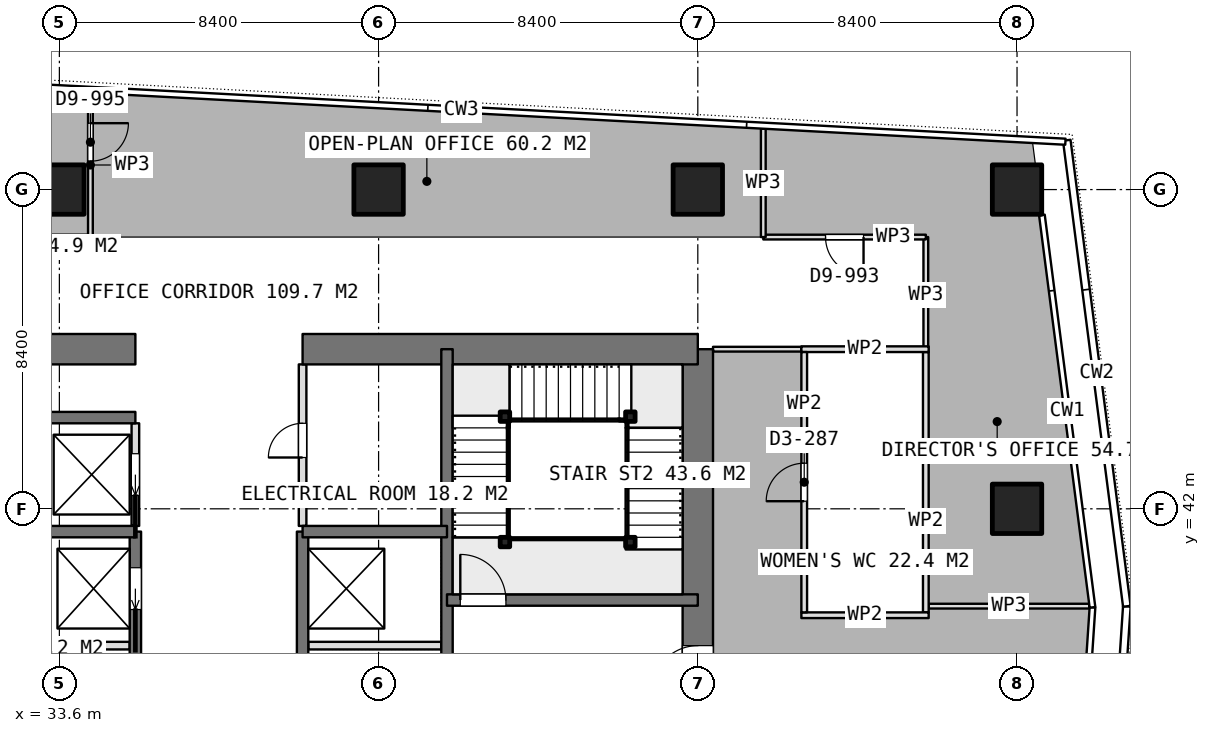
"""IFC4 building model, lengths in metres.
Left out: names, types, materials, properties, quantities, classifications, styles, units other than length and angle.
Written with IfcOpenShell. Run it as: python <this file> out.ifc"""

import sys

from ifc_helpers import new_model, si_unit, direction, frame, frame_2d, origin, origin_2d, place, context, subcontext, project, spatial, rectangle, extrude, element, fill, save


model = new_model("IFC4")
c1 = context("Model", 3, precision=1e-05, world=origin(), true_north=direction((0.0, 1.0)))
c2 = subcontext(c1, "Body", "Model", "MODEL_VIEW")
j1 = project(units=[si_unit("LENGTHUNIT", "METRE"), si_unit("PLANEANGLEUNIT", "RADIAN")], contexts=[c1])
p1 = place(None, origin())
s1 = spatial("IfcSite", under=j1, at=p1, CompositionType="ELEMENT")
p2 = place(p1, origin())
s2 = spatial("IfcBuilding", under=s1, at=p2, CompositionType="ELEMENT")
p3 = place(p2, frame((0.0, 0.0, 265.1)))
s3 = spatial("IfcBuildingStorey", under=s2, at=p3, CompositionType="ELEMENT", Elevation=265.1)
p4 = place(p3, frame((25.2, 46.2, 0.0), z_axis=(0.0, 0.0, 1.0), x_axis=(1.0, 0.0, 0.0)))
e1 = element("IfcWall", 1, at=p4, inside=s3, PredefinedType="SHEAR", context=c2, shape_type="SweptSolid", body=[
    extrude(rectangle(XDim=10.4, YDim=0.8, at=frame_2d((5.2, 0.0))), origin(), (0.0, 0.0, 1.0), 3.75),
])
p5 = place(p3, frame((40.0, 46.2, 0.0), z_axis=(0.0, 0.0, 1.0), x_axis=(1.0, 0.0, 0.0)))
e2 = element("IfcWall", 2, at=p5, inside=s3, PredefinedType="SHEAR", context=c2, shape_type="SweptSolid", body=[
    extrude(rectangle(XDim=10.4, YDim=0.8, at=frame_2d((5.2, 0.0))), origin(), (0.0, 0.0, 1.0), 3.75),
])
p6 = place(p3, frame((50.4, 21.0, 0.0), z_axis=(0.0, 0.0, 1.0), x_axis=(0.0, 1.0, 0.0)))
e3 = element("IfcWall", 3, at=p6, inside=s3, PredefinedType="SHEAR", context=c2, shape_type="SweptSolid", body=[
    extrude(rectangle(XDim=25.2, YDim=0.8, at=frame_2d((12.6, 0.0))), origin(), (0.0, 0.0, 1.0), 3.75),
])
p7 = place(p6, frame((16.2, 0.0, 0.0)))
e4 = element("IfcOpeningElement", 4, at=p7, cuts=e3, PredefinedType="OPENING", context=c2, shape_type="SweptSolid", body=[
    extrude(rectangle(XDim=1.2, YDim=2.1, at=frame_2d((0.6, 1.05))), frame((0.0, 0.41, 0.0), z_axis=(0.0, -1.0, 0.0), x_axis=(1.0, 0.0, 0.0)), (0.0, 0.0, 1.0), 0.82),
])
p8 = place(p6, frame((10.05, 0.0, 0.0)))
e5 = element("IfcOpeningElement", 5, at=p8, cuts=e3, PredefinedType="OPENING", context=c2, shape_type="SweptSolid", body=[
    extrude(rectangle(XDim=0.9, YDim=2.1, at=frame_2d((0.45, 1.05))), frame((0.0, 0.41, 0.0), z_axis=(0.0, -1.0, 0.0), x_axis=(1.0, 0.0, 0.0)), (0.0, 0.0, 1.0), 0.82),
])
p9 = place(p6, frame((7.45, 0.0, 0.0)))
e6 = element("IfcOpeningElement", 6, at=p9, cuts=e3, PredefinedType="OPENING", context=c2, shape_type="SweptSolid", body=[
    extrude(rectangle(XDim=0.9, YDim=2.1, at=frame_2d((0.45, 1.05))), frame((0.0, 0.41, 0.0), z_axis=(0.0, -1.0, 0.0), x_axis=(1.0, 0.0, 0.0)), (0.0, 0.0, 1.0), 0.82),
])
p10 = place(p6, frame((0.6, 0.0, 0.0)))
e7 = element("IfcOpeningElement", 7, at=p10, cuts=e3, PredefinedType="OPENING", context=c2, shape_type="SweptSolid", body=[
    extrude(rectangle(XDim=1.2, YDim=2.1, at=frame_2d((0.6, 1.05))), frame((0.0, 0.41, 0.0), z_axis=(0.0, -1.0, 0.0), x_axis=(1.0, 0.0, 0.0)), (0.0, 0.0, 1.0), 0.82),
])
p11 = place(p3, frame((43.8, 21.0, 0.0), z_axis=(0.0, 0.0, 1.0), x_axis=(0.0, 1.0, 0.0)))
e8 = element("IfcWall", 8, at=p11, inside=s3, PredefinedType="SHEAR", context=c2, shape_type="SweptSolid", body=[
    extrude(rectangle(XDim=25.2, YDim=0.3, at=frame_2d((12.6, 0.0))), origin(), (0.0, 0.0, 1.0), 3.75),
])
p12 = place(p3, frame((35.6, 23.4, 0.0), z_axis=(0.0, 0.0, 1.0), x_axis=(0.0, 1.0, 0.0)))
e9 = element("IfcWall", 9, at=p12, inside=s3, PredefinedType="SHEAR", context=c2, shape_type="SweptSolid", body=[
    extrude(rectangle(XDim=18.0, YDim=0.3, at=frame_2d((9.0, 0.0))), origin(), (0.0, 0.0, 1.0), 3.75),
])
p13 = place(p12, frame((0.95, 0.0, 0.0)))
e10 = element("IfcOpeningElement", 10, at=p13, cuts=e9, PredefinedType="OPENING", context=c2, shape_type="SweptSolid", body=[
    extrude(rectangle(XDim=1.1, YDim=2.1, at=frame_2d((0.55, 1.05))), frame((0.0, 0.16, 0.0), z_axis=(0.0, -1.0, 0.0), x_axis=(1.0, 0.0, 0.0)), (0.0, 0.0, 1.0), 0.32),
])
p14 = place(p12, frame((3.95, 0.0, 0.0)))
e11 = element("IfcOpeningElement", 11, at=p14, cuts=e9, PredefinedType="OPENING", context=c2, shape_type="SweptSolid", body=[
    extrude(rectangle(XDim=1.1, YDim=2.1, at=frame_2d((0.55, 1.05))), frame((0.0, 0.16, 0.0), z_axis=(0.0, -1.0, 0.0), x_axis=(1.0, 0.0, 0.0)), (0.0, 0.0, 1.0), 0.32),
])
p15 = place(p12, frame((6.95, 0.0, 0.0)))
e12 = element("IfcOpeningElement", 12, at=p15, cuts=e9, PredefinedType="OPENING", context=c2, shape_type="SweptSolid", body=[
    extrude(rectangle(XDim=1.1, YDim=2.1, at=frame_2d((0.55, 1.05))), frame((0.0, 0.16, 0.0), z_axis=(0.0, -1.0, 0.0), x_axis=(1.0, 0.0, 0.0)), (0.0, 0.0, 1.0), 0.32),
])
p16 = place(p12, frame((9.95, 0.0, 0.0)))
e13 = element("IfcOpeningElement", 13, at=p16, cuts=e9, PredefinedType="OPENING", context=c2, shape_type="SweptSolid", body=[
    extrude(rectangle(XDim=1.1, YDim=2.1, at=frame_2d((0.55, 1.05))), frame((0.0, 0.16, 0.0), z_axis=(0.0, -1.0, 0.0), x_axis=(1.0, 0.0, 0.0)), (0.0, 0.0, 1.0), 0.32),
])
p17 = place(p12, frame((12.95, 0.0, 0.0)))
e14 = element("IfcOpeningElement", 14, at=p17, cuts=e9, PredefinedType="OPENING", context=c2, shape_type="SweptSolid", body=[
    extrude(rectangle(XDim=1.1, YDim=2.1, at=frame_2d((0.55, 1.05))), frame((0.0, 0.16, 0.0), z_axis=(0.0, -1.0, 0.0), x_axis=(1.0, 0.0, 0.0)), (0.0, 0.0, 1.0), 0.32),
])
p18 = place(p12, frame((15.95, 0.0, 0.0)))
e15 = element("IfcOpeningElement", 15, at=p18, cuts=e9, PredefinedType="OPENING", context=c2, shape_type="SweptSolid", body=[
    extrude(rectangle(XDim=1.1, YDim=2.1, at=frame_2d((0.55, 1.05))), frame((0.0, 0.16, 0.0), z_axis=(0.0, -1.0, 0.0), x_axis=(1.0, 0.0, 0.0)), (0.0, 0.0, 1.0), 0.32),
])
p19 = place(p3, frame((40.0, 23.4, 0.0), z_axis=(0.0, 0.0, 1.0), x_axis=(0.0, 1.0, 0.0)))
e16 = element("IfcWall", 16, at=p19, inside=s3, PredefinedType="SHEAR", context=c2, shape_type="SweptSolid", body=[
    extrude(rectangle(XDim=18.0, YDim=0.3, at=frame_2d((9.0, 0.0))), origin(), (0.0, 0.0, 1.0), 3.75),
])
p20 = place(p19, frame((1.95, 0.0, 0.0)))
e17 = element("IfcOpeningElement", 17, at=p20, cuts=e16, PredefinedType="OPENING", context=c2, shape_type="SweptSolid", body=[
    extrude(rectangle(XDim=0.9, YDim=2.1, at=frame_2d((0.45, 1.05))), frame((0.0, 0.16, 0.0), z_axis=(0.0, -1.0, 0.0), x_axis=(1.0, 0.0, 0.0)), (0.0, 0.0, 1.0), 0.32),
])
p21 = place(p19, frame((7.95, 0.0, 0.0)))
e18 = element("IfcOpeningElement", 18, at=p21, cuts=e16, PredefinedType="OPENING", context=c2, shape_type="SweptSolid", body=[
    extrude(rectangle(XDim=0.9, YDim=2.1, at=frame_2d((0.45, 1.05))), frame((0.0, 0.16, 0.0), z_axis=(0.0, -1.0, 0.0), x_axis=(1.0, 0.0, 0.0)), (0.0, 0.0, 1.0), 0.32),
])
for number, where, z_axis, x_axis in (
    (19, (31.8, 41.4, 0.0), (0.0, 0.0, 1.0), (1.0, 0.0, 0.0)),
    (20, (31.8, 44.4, 0.0), (0.0, 0.0, 1.0), (1.0, 0.0, 0.0)),
    (21, (40.0, 41.4, 0.0), (0.0, 0.0, 1.0), (1.0, 0.0, 0.0)),
):
    element("IfcWall", number, at=place(p3, frame(where, z_axis=z_axis, x_axis=x_axis)), inside=s3, PredefinedType="SHEAR", context=c2, shape_type="SweptSolid", body=[
        extrude(rectangle(XDim=3.8, YDim=0.3, at=frame_2d((1.9, 0.0))), origin(), (0.0, 0.0, 1.0), 3.75),
    ])
p22 = place(p3, frame((43.8, 39.6, 0.0), z_axis=(0.0, 0.0, 1.0), x_axis=(1.0, 0.0, 0.0)))
e22 = element("IfcWall", 22, at=p22, inside=s3, PredefinedType="SHEAR", context=c2, shape_type="SweptSolid", body=[
    extrude(rectangle(XDim=6.6, YDim=0.3, at=frame_2d((3.3, 0.0))), origin(), (0.0, 0.0, 1.0), 3.75),
])
p23 = place(p22, frame((0.35, 0.0, 0.0)))
e23 = element("IfcOpeningElement", 23, at=p23, cuts=e22, PredefinedType="OPENING", context=c2, shape_type="SweptSolid", body=[
    extrude(rectangle(XDim=1.2, YDim=2.1, at=frame_2d((0.6, 1.05))), frame((0.0, 0.16, 0.0), z_axis=(0.0, -1.0, 0.0), x_axis=(1.0, 0.0, 0.0)), (0.0, 0.0, 1.0), 0.32),
])
for number, where, z_axis, x_axis in (
    (24, (33.6, 50.4, 0.0), (0.0, 0.0, 1.0), (1.0, 0.0, 0.0)),
    (25, (42.0, 50.4, 0.0), (0.0, 0.0, 1.0), (1.0, 0.0, 0.0)),
    (26, (50.4, 50.4, 0.0), (0.0, 0.0, 1.0), (1.0, 0.0, 0.0)),
    (27, (58.8, 42.0, 0.0), (0.0, 0.0, 1.0), (1.0, 0.0, 0.0)),
    (28, (58.8, 50.4, 0.0), (0.0, 0.0, 1.0), (1.0, 0.0, 0.0)),
):
    element("IfcColumn", number, at=place(p3, frame(where, z_axis=z_axis, x_axis=x_axis)), inside=s3, PredefinedType="COLUMN", context=c2, shape_type="SweptSolid", body=[
        extrude(rectangle(XDim=1.3, YDim=1.3, at=origin_2d()), origin(), (0.0, 0.0, 1.0), 3.75),
    ])
for number, where, z_axis, x_axis in (
    (29, (31.95, 38.4, 0.0), (0.0, 0.0, 1.0), (1.0, 0.0, 0.0)),
    (30, (40.15, 38.4, 0.0), (0.0, 0.0, 1.0), (1.0, 0.0, 0.0)),
):
    element("IfcWall", number, at=place(p3, frame(where, z_axis=z_axis, x_axis=x_axis)), inside=s3, PredefinedType="PARTITIONING", context=c2, shape_type="SweptSolid", body=[
        extrude(rectangle(XDim=3.5, YDim=0.2, at=frame_2d((1.75, 0.0))), origin(), (0.0, 0.0, 1.0), 3.5),
    ])
p24 = place(p3, frame((40.0, 41.55, 0.0), z_axis=(0.0, 0.0, 1.0), x_axis=(0.0, 1.0, 0.0)))
e31 = element("IfcWall", 31, at=p24, inside=s3, PredefinedType="PARTITIONING", context=c2, shape_type="SweptSolid", body=[
    extrude(rectangle(XDim=4.25, YDim=0.2, at=frame_2d((2.125, 0.0))), origin(), (0.0, 0.0, 1.0), 3.5),
])
p25 = place(p24, frame((1.8, 0.0, 0.0)))
e32 = element("IfcOpeningElement", 32, at=p25, cuts=e31, PredefinedType="OPENING", context=c2, shape_type="SweptSolid", body=[
    extrude(rectangle(XDim=0.9, YDim=2.1, at=frame_2d((0.45, 1.05))), frame((0.0, 0.11, 0.0), z_axis=(0.0, -1.0, 0.0), x_axis=(1.0, 0.0, 0.0)), (0.0, 0.0, 1.0), 0.22),
])
p26 = place(p3, frame((35.6, 41.55, 0.0), z_axis=(0.0, 0.0, 1.0), x_axis=(0.0, 1.0, 0.0)))
e33 = element("IfcWall", 33, at=p26, inside=s3, PredefinedType="PARTITIONING", context=c2, shape_type="SweptSolid", body=[
    extrude(rectangle(XDim=2.7, YDim=0.2, at=frame_2d((1.35, 0.0))), origin(), (0.0, 0.0, 1.0), 3.5),
])
p27 = place(p26, frame((0.8, 0.0, 0.0)))
e34 = element("IfcOpeningElement", 34, at=p27, cuts=e33, PredefinedType="OPENING", context=c2, shape_type="SweptSolid", body=[
    extrude(rectangle(XDim=1.1, YDim=2.1, at=frame_2d((0.55, 1.05))), frame((0.0, 0.11, 0.0), z_axis=(0.0, -1.0, 0.0), x_axis=(1.0, 0.0, 0.0)), (0.0, 0.0, 1.0), 0.22),
])
for number, where, z_axis, x_axis in (
    (35, (53.125, 39.2, 0.0), (0.0, 0.0, 1.0), (1.0, 0.0, 0.0)),
    (36, (53.125, 46.2, 0.0), (0.0, 0.0, 1.0), (1.0, 0.0, 0.0)),
):
    element("IfcWall", number, at=place(p3, frame(where, z_axis=z_axis, x_axis=x_axis)), inside=s3, PredefinedType="PARTITIONING", context=c2, shape_type="SweptSolid", body=[
        extrude(rectangle(XDim=3.35, YDim=0.15, at=frame_2d((1.675, 0.0))), origin(), (0.0, 0.0, 1.0), 3.5),
    ])
p28 = place(p3, frame((53.2, 39.275, 0.0), z_axis=(0.0, 0.0, 1.0), x_axis=(0.0, 1.0, 0.0)))
e37 = element("IfcWall", 37, at=p28, inside=s3, PredefinedType="PARTITIONING", context=c2, shape_type="SweptSolid", body=[
    extrude(rectangle(XDim=6.85, YDim=0.15, at=frame_2d((3.425, 0.0))), origin(), (0.0, 0.0, 1.0), 3.5),
])
p29 = place(p28, frame((2.925, 0.0, 0.0)))
e38 = element("IfcOpeningElement", 38, at=p29, cuts=e37, PredefinedType="OPENING", context=c2, shape_type="SweptSolid", body=[
    extrude(rectangle(XDim=1.0, YDim=2.1, at=frame_2d((0.5, 1.05))), frame((0.0, 0.085, 0.0), z_axis=(0.0, -1.0, 0.0), x_axis=(1.0, 0.0, 0.0)), (0.0, 0.0, 1.0), 0.17),
])
p30 = place(p3, frame((56.4, 39.275, 0.0), z_axis=(0.0, 0.0, 1.0), x_axis=(0.0, 1.0, 0.0)))
e39 = element("IfcWall", 39, at=p30, inside=s3, PredefinedType="PARTITIONING", context=c2, shape_type="SweptSolid", body=[
    extrude(rectangle(XDim=6.85, YDim=0.15, at=frame_2d((3.425, 0.0))), origin(), (0.0, 0.0, 1.0), 3.5),
])
p31 = place(p3, frame((50.8, 46.2, 0.0), z_axis=(0.0, 0.0, 1.0), x_axis=(1.0, 0.0, 0.0)))
e40 = element("IfcWall", 40, at=p31, inside=s3, PredefinedType="PARTITIONING", context=c2, shape_type="SweptSolid", body=[
    extrude(rectangle(XDim=2.324, YDim=0.125, at=frame_2d((1.162, 0.0))), origin(), (0.0, 0.0, 1.0), 3.5),
])
p32 = place(p3, frame((56.475, 39.439, 0.0), z_axis=(0.0, 0.0, 1.0), x_axis=(1.0, 0.0, 0.0)))
e41 = element("IfcWall", 41, at=p32, inside=s3, PredefinedType="PARTITIONING", context=c2, shape_type="SweptSolid", body=[
    extrude(rectangle(XDim=4.225, YDim=0.125, at=frame_2d((2.112, 0.0))), origin(), (0.0, 0.0, 1.0), 3.5),
])
p33 = place(p3, frame((56.4, 46.125, 0.0), z_axis=(0.0, 0.0, 1.0), x_axis=(0.0, 1.0, 0.0)))
e42 = element("IfcWall", 42, at=p33, inside=s3, PredefinedType="PARTITIONING", context=c2, shape_type="SweptSolid", body=[
    extrude(rectangle(XDim=3.025, YDim=0.125, at=frame_2d((1.512, 0.0))), origin(), (0.0, 0.0, 1.0), 3.5),
])
p34 = place(p3, frame((56.4, 49.15, 0.0), z_axis=(0.0, 0.0, 1.0), x_axis=(-1.0, 0.0, 0.0)))
e43 = element("IfcWall", 43, at=p34, inside=s3, PredefinedType="PARTITIONING", context=c2, shape_type="SweptSolid", body=[
    extrude(rectangle(XDim=4.277, YDim=0.125, at=frame_2d((2.138, 0.0))), origin(), (0.0, 0.0, 1.0), 3.5),
])
p35 = place(p34, frame((1.639, 0.0, 0.0)))
e44 = element("IfcOpeningElement", 44, at=p35, cuts=e43, PredefinedType="OPENING", context=c2, shape_type="SweptSolid", body=[
    extrude(rectangle(XDim=1.0, YDim=2.1, at=frame_2d((0.5, 1.05))), frame((0.0, 0.073, 0.0), z_axis=(0.0, -1.0, 0.0), x_axis=(1.0, 0.0, 0.0)), (0.0, 0.0, 1.0), 0.145),
])
p36 = place(p3, frame((52.123, 49.15, 0.0), z_axis=(0.0, 0.0, 1.0), x_axis=(0.0, 1.0, 0.0)))
e45 = element("IfcWall", 45, at=p36, inside=s3, PredefinedType="PARTITIONING", context=c2, shape_type="SweptSolid", body=[
    extrude(rectangle(XDim=2.852, YDim=0.125, at=frame_2d((1.426, 0.0))), origin(), (0.0, 0.0, 1.0), 3.5),
])
p37 = place(p3, frame((34.417, 52.943, 0.0), z_axis=(0.0, 0.0, 1.0), x_axis=(0.0, -1.0, 0.0)))
e46 = element("IfcWall", 46, at=p37, inside=s3, PredefinedType="PARTITIONING", context=c2, shape_type="SweptSolid", body=[
    extrude(rectangle(XDim=3.793, YDim=0.125, at=frame_2d((1.896, 0.0))), origin(), (0.0, 0.0, 1.0), 3.5),
])
p38 = place(p37, frame((0.796, 0.0, 0.0)))
e47 = element("IfcOpeningElement", 47, at=p38, cuts=e46, PredefinedType="OPENING", context=c2, shape_type="SweptSolid", body=[
    extrude(rectangle(XDim=1.0, YDim=2.1, at=frame_2d((0.5, 1.05))), frame((0.0, 0.073, 0.0), z_axis=(0.0, -1.0, 0.0), x_axis=(1.0, 0.0, 0.0)), (0.0, 0.0, 1.0), 0.145),
])
p39 = place(p3, frame((34.417, 49.15, 0.0), z_axis=(0.0, 0.0, 1.0), x_axis=(-1.0, 0.0, 0.0)))
e48 = element("IfcWall", 48, at=p39, inside=s3, PredefinedType="PARTITIONING", context=c2, shape_type="SweptSolid", body=[
    extrude(rectangle(XDim=6.179, YDim=0.125, at=frame_2d((3.089, 0.0))), origin(), (0.0, 0.0, 1.0), 3.5),
])
for number, where, z_axis, x_axis in (
    (49, (45.325, 41.125, 0.0), (0.0, 0.0, 1.0), (1.0, 0.0, 0.0)),
    (50, (45.325, 44.425, 0.0), (0.0, 0.0, 1.0), (1.0, 0.0, 0.0)),
    (51, (48.625, 44.425, 0.0), (0.0, 0.0, 1.0), (1.0, 0.0, 0.0)),
    (52, (48.625, 41.125, 0.0), (0.0, 0.0, 1.0), (1.0, 0.0, 0.0)),
):
    element("IfcColumn", number, at=place(p3, frame(where, z_axis=z_axis, x_axis=x_axis)), inside=s3, PredefinedType="COLUMN", context=c2, shape_type="SweptSolid", body=[
        extrude(rectangle(XDim=0.25, YDim=0.25, at=origin_2d()), origin(), (0.0, 0.0, 1.0), 3.75),
    ])
p40 = place(p7, origin())
e53 = element("IfcDoor", 53, at=p40, inside=s3, OperationType="SINGLE_SWING_LEFT", PredefinedType="DOOR", context=c2, shape_type="SweptSolid", body=[
    extrude(rectangle(XDim=1.2, YDim=2.1, at=frame_2d((0.6, 1.05))), frame((0.0, 0.025, 0.0), z_axis=(0.0, -1.0, 0.0), x_axis=(1.0, 0.0, 0.0)), (0.0, 0.0, 1.0), 0.05),
])
fill(e4, e53)
p41 = place(p25, origin())
e54 = element("IfcDoor", 54, at=p41, inside=s3, OperationType="SINGLE_SWING_LEFT", PredefinedType="DOOR", context=c2, shape_type="SweptSolid", body=[
    extrude(rectangle(XDim=0.9, YDim=2.1, at=frame_2d((0.45, 1.05))), frame((0.0, 0.025, 0.0), z_axis=(0.0, -1.0, 0.0), x_axis=(1.0, 0.0, 0.0)), (0.0, 0.0, 1.0), 0.05),
])
fill(e32, e54)
p42 = place(p18, origin())
e55 = element("IfcDoor", 55, at=p42, inside=s3, OperationType="SLIDING_TO_LEFT", PredefinedType="USERDEFINED", context=c2, shape_type="SweptSolid", body=[
    extrude(rectangle(XDim=1.1, YDim=2.1, at=frame_2d((0.55, 1.05))), frame((0.0, 0.025, 0.0), z_axis=(0.0, -1.0, 0.0), x_axis=(1.0, 0.0, 0.0)), (0.0, 0.0, 1.0), 0.05),
])
fill(e15, e55)
p43 = place(p27, origin())
e56 = element("IfcDoor", 56, at=p43, inside=s3, OperationType="SLIDING_TO_LEFT", PredefinedType="USERDEFINED", context=c2, shape_type="SweptSolid", body=[
    extrude(rectangle(XDim=1.1, YDim=2.1, at=frame_2d((0.55, 1.05))), frame((0.0, 0.025, 0.0), z_axis=(0.0, -1.0, 0.0), x_axis=(1.0, 0.0, 0.0)), (0.0, 0.0, 1.0), 0.05),
])
fill(e34, e56)
p44 = place(p29, origin())
e57 = element("IfcDoor", 57, at=p44, inside=s3, OperationType="SINGLE_SWING_LEFT", PredefinedType="DOOR", context=c2, shape_type="SweptSolid", body=[
    extrude(rectangle(XDim=1.0, YDim=2.1, at=frame_2d((0.5, 1.05))), frame((0.0, 0.025, 0.0), z_axis=(0.0, -1.0, 0.0), x_axis=(1.0, 0.0, 0.0)), (0.0, 0.0, 1.0), 0.05),
])
fill(e38, e57)
p45 = place(p35, origin())
e58 = element("IfcDoor", 58, at=p45, inside=s3, OperationType="SINGLE_SWING_LEFT", PredefinedType="DOOR", context=c2, shape_type="SweptSolid", body=[
    extrude(rectangle(XDim=1.0, YDim=2.1, at=frame_2d((0.5, 1.05))), frame((0.0, 0.025, 0.0), z_axis=(0.0, -1.0, 0.0), x_axis=(1.0, 0.0, 0.0)), (0.0, 0.0, 1.0), 0.05),
])
fill(e44, e58)
p46 = place(p38, origin())
e59 = element("IfcDoor", 59, at=p46, inside=s3, OperationType="SINGLE_SWING_LEFT", PredefinedType="DOOR", context=c2, shape_type="SweptSolid", body=[
    extrude(rectangle(XDim=1.0, YDim=2.1, at=frame_2d((0.5, 1.05))), frame((0.0, 0.025, 0.0), z_axis=(0.0, -1.0, 0.0), x_axis=(1.0, 0.0, 0.0)), (0.0, 0.0, 1.0), 0.05),
])
fill(e47, e59)
p47 = place(p23, origin())
e60 = element("IfcDoor", 60, at=p47, inside=s3, OperationType="SINGLE_SWING_RIGHT", PredefinedType="DOOR", context=c2, shape_type="SweptSolid", body=[
    extrude(rectangle(XDim=1.2, YDim=2.1, at=frame_2d((0.6, 1.05))), frame((0.0, 0.025, 0.0), z_axis=(0.0, -1.0, 0.0), x_axis=(1.0, 0.0, 0.0)), (0.0, 0.0, 1.0), 0.05),
])
fill(e23, e60)
save(model, sys.argv[1])
